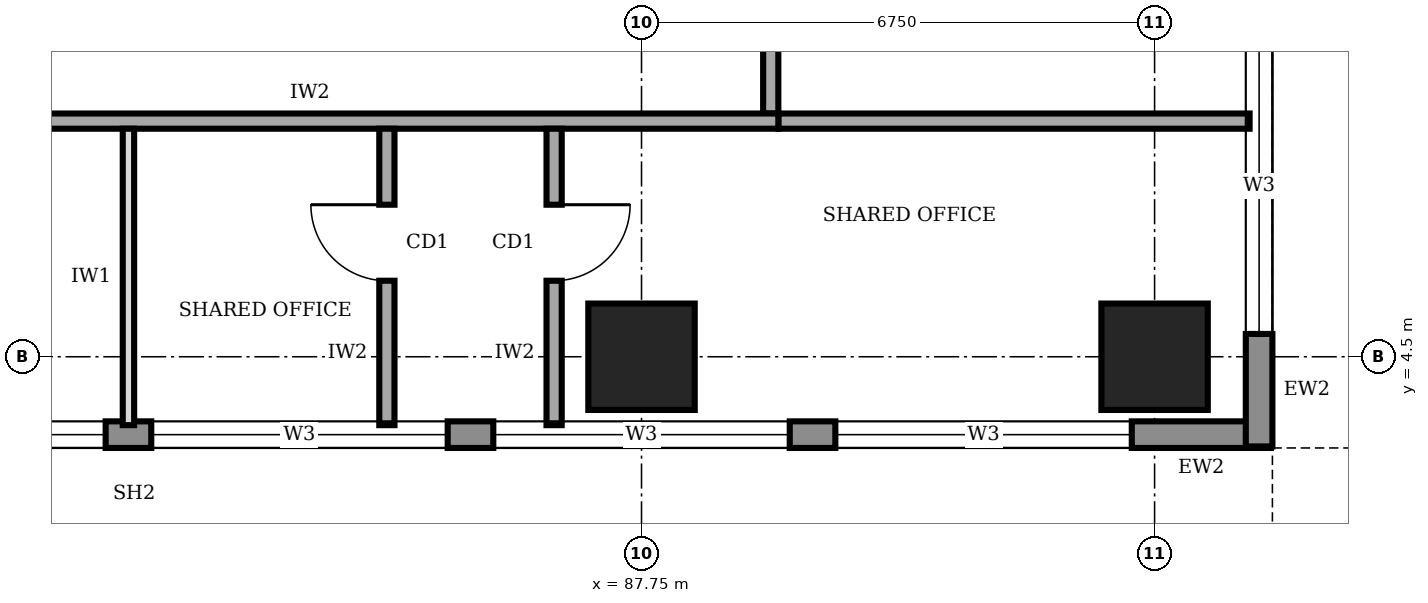
"""IFC4 building model, lengths in metres.
Left out: names, types, materials, properties, quantities, classifications, styles, units other than length and angle.
Written with IfcOpenShell. Run it as: python <this file> out.ifc"""

import sys

from ifc_helpers import new_model, si_unit, direction, frame, frame_2d, origin, origin_2d, place, context, subcontext, project, spatial, rectangle, extrude, element, fill, save


model = new_model("IFC4")
c1 = context("Model", 3, precision=1e-05, world=origin(), true_north=direction((0.0, 1.0)))
c2 = subcontext(c1, "Body", "Model", "MODEL_VIEW")
j1 = project(units=[si_unit("LENGTHUNIT", "METRE"), si_unit("PLANEANGLEUNIT", "RADIAN")], contexts=[c1])
p1 = place(None, origin())
s1 = spatial("IfcSite", under=j1, at=p1, CompositionType="ELEMENT")
p2 = place(p1, origin())
s2 = spatial("IfcBuilding", under=s1, at=p2, CompositionType="ELEMENT")
p3 = place(p2, frame((0.0, 0.0, 197.0)))
s3 = spatial("IfcBuildingStorey", under=s2, at=p3, CompositionType="ELEMENT", Elevation=197.0)
for number, where, z_axis, x_axis in (
    (1, (87.75, 4.5, 0.0), (0.0, 0.0, 1.0), (1.0, 0.0, 0.0)),
    (2, (94.5, 4.5, 0.0), (0.0, 0.0, 1.0), (1.0, 0.0, 0.0)),
):
    element("IfcColumn", number, at=place(p3, frame(where, z_axis=z_axis, x_axis=x_axis)), inside=s3, PredefinedType="COLUMN", context=c2, shape_type="SweptSolid", body=[
        extrude(rectangle(XDim=1.4, YDim=1.4, at=origin_2d()), origin(), (0.0, 0.0, 1.0), 4.0),
    ])
p4 = place(p3, frame((66.12, 3.475, 0.0), z_axis=(0.0, 0.0, 1.0), x_axis=(1.0, 0.0, 0.0)))
e3 = element("IfcWall", 3, at=p4, inside=s3, PredefinedType="STANDARD", context=c2, shape_type="SweptSolid", body=[
    extrude(rectangle(XDim=29.91, YDim=0.35, at=frame_2d((14.955, 0.0))), origin(), (0.0, 0.0, 1.0), 3.75),
])
p5 = place(p4, frame((1.68, 0.0, 0.95)))
e4 = element("IfcOpeningElement", 4, at=p5, cuts=e3, PredefinedType="OPENING", context=c2, shape_type="SweptSolid", body=[
    extrude(rectangle(XDim=3.9, YDim=1.8, at=frame_2d((1.95, 0.9))), frame((0.0, 0.185, 0.0), z_axis=(0.0, -1.0, 0.0), x_axis=(1.0, 0.0, 0.0)), (0.0, 0.0, 1.0), 0.37),
])
p6 = place(p4, frame((6.18, 0.0, 0.95)))
e5 = element("IfcOpeningElement", 5, at=p6, cuts=e3, PredefinedType="OPENING", context=c2, shape_type="SweptSolid", body=[
    extrude(rectangle(XDim=3.9, YDim=1.8, at=frame_2d((1.95, 0.9))), frame((0.0, 0.185, 0.0), z_axis=(0.0, -1.0, 0.0), x_axis=(1.0, 0.0, 0.0)), (0.0, 0.0, 1.0), 0.37),
])
p7 = place(p4, frame((10.68, 0.0, 0.95)))
e6 = element("IfcOpeningElement", 6, at=p7, cuts=e3, PredefinedType="OPENING", context=c2, shape_type="SweptSolid", body=[
    extrude(rectangle(XDim=3.9, YDim=1.8, at=frame_2d((1.95, 0.9))), frame((0.0, 0.185, 0.0), z_axis=(0.0, -1.0, 0.0), x_axis=(1.0, 0.0, 0.0)), (0.0, 0.0, 1.0), 0.37),
])
p8 = place(p4, frame((15.18, 0.0, 0.95)))
e7 = element("IfcOpeningElement", 7, at=p8, cuts=e3, PredefinedType="OPENING", context=c2, shape_type="SweptSolid", body=[
    extrude(rectangle(XDim=3.9, YDim=1.8, at=frame_2d((1.95, 0.9))), frame((0.0, 0.185, 0.0), z_axis=(0.0, -1.0, 0.0), x_axis=(1.0, 0.0, 0.0)), (0.0, 0.0, 1.0), 0.37),
])
p9 = place(p4, frame((19.68, 0.0, 0.95)))
e8 = element("IfcOpeningElement", 8, at=p9, cuts=e3, PredefinedType="OPENING", context=c2, shape_type="SweptSolid", body=[
    extrude(rectangle(XDim=3.9, YDim=1.8, at=frame_2d((1.95, 0.9))), frame((0.0, 0.185, 0.0), z_axis=(0.0, -1.0, 0.0), x_axis=(1.0, 0.0, 0.0)), (0.0, 0.0, 1.0), 0.37),
])
p10 = place(p4, frame((24.18, 0.0, 0.95)))
e9 = element("IfcOpeningElement", 9, at=p10, cuts=e3, PredefinedType="OPENING", context=c2, shape_type="SweptSolid", body=[
    extrude(rectangle(XDim=3.9, YDim=1.8, at=frame_2d((1.95, 0.9))), frame((0.0, 0.185, 0.0), z_axis=(0.0, -1.0, 0.0), x_axis=(1.0, 0.0, 0.0)), (0.0, 0.0, 1.0), 0.37),
])
p11 = place(p3, frame((95.875, 3.32, 0.0), z_axis=(0.0, 0.0, 1.0), x_axis=(0.0, 1.0, 0.0)))
e10 = element("IfcWall", 10, at=p11, inside=s3, PredefinedType="STANDARD", context=c2, shape_type="SweptSolid", body=[
    extrude(rectangle(XDim=33.86, YDim=0.35, at=frame_2d((16.93, 0.0))), origin(), (0.0, 0.0, 1.0), 3.75),
])
p12 = place(p11, frame((1.48, 0.0, 0.95)))
e11 = element("IfcOpeningElement", 11, at=p12, cuts=e10, PredefinedType="OPENING", context=c2, shape_type="SweptSolid", body=[
    extrude(rectangle(XDim=3.9, YDim=1.8, at=frame_2d((1.95, 0.9))), frame((0.0, 0.185, 0.0), z_axis=(0.0, -1.0, 0.0), x_axis=(1.0, 0.0, 0.0)), (0.0, 0.0, 1.0), 0.37),
])
p13 = place(p11, frame((5.98, 0.0, 0.95)))
e12 = element("IfcOpeningElement", 12, at=p13, cuts=e10, PredefinedType="OPENING", context=c2, shape_type="SweptSolid", body=[
    extrude(rectangle(XDim=3.9, YDim=1.8, at=frame_2d((1.95, 0.9))), frame((0.0, 0.185, 0.0), z_axis=(0.0, -1.0, 0.0), x_axis=(1.0, 0.0, 0.0)), (0.0, 0.0, 1.0), 0.37),
])
p14 = place(p11, frame((10.48, 0.0, 0.95)))
e13 = element("IfcOpeningElement", 13, at=p14, cuts=e10, PredefinedType="OPENING", context=c2, shape_type="SweptSolid", body=[
    extrude(rectangle(XDim=3.9, YDim=1.8, at=frame_2d((1.95, 0.9))), frame((0.0, 0.185, 0.0), z_axis=(0.0, -1.0, 0.0), x_axis=(1.0, 0.0, 0.0)), (0.0, 0.0, 1.0), 0.37),
])
p15 = place(p11, frame((14.98, 0.0, 0.95)))
e14 = element("IfcOpeningElement", 14, at=p15, cuts=e10, PredefinedType="OPENING", context=c2, shape_type="SweptSolid", body=[
    extrude(rectangle(XDim=3.9, YDim=1.8, at=frame_2d((1.95, 0.9))), frame((0.0, 0.185, 0.0), z_axis=(0.0, -1.0, 0.0), x_axis=(1.0, 0.0, 0.0)), (0.0, 0.0, 1.0), 0.37),
])
p16 = place(p11, frame((19.48, 0.0, 0.95)))
e15 = element("IfcOpeningElement", 15, at=p16, cuts=e10, PredefinedType="OPENING", context=c2, shape_type="SweptSolid", body=[
    extrude(rectangle(XDim=3.9, YDim=1.8, at=frame_2d((1.95, 0.9))), frame((0.0, 0.185, 0.0), z_axis=(0.0, -1.0, 0.0), x_axis=(1.0, 0.0, 0.0)), (0.0, 0.0, 1.0), 0.37),
])
p17 = place(p11, frame((23.98, 0.0, 0.95)))
e16 = element("IfcOpeningElement", 16, at=p17, cuts=e10, PredefinedType="OPENING", context=c2, shape_type="SweptSolid", body=[
    extrude(rectangle(XDim=3.9, YDim=1.8, at=frame_2d((1.95, 0.9))), frame((0.0, 0.185, 0.0), z_axis=(0.0, -1.0, 0.0), x_axis=(1.0, 0.0, 0.0)), (0.0, 0.0, 1.0), 0.37),
])
p18 = place(p11, frame((28.48, 0.0, 0.95)))
e17 = element("IfcOpeningElement", 17, at=p18, cuts=e10, PredefinedType="OPENING", context=c2, shape_type="SweptSolid", body=[
    extrude(rectangle(XDim=3.9, YDim=1.8, at=frame_2d((1.95, 0.9))), frame((0.0, 0.185, 0.0), z_axis=(0.0, -1.0, 0.0), x_axis=(1.0, 0.0, 0.0)), (0.0, 0.0, 1.0), 0.37),
])
p19 = place(p3, frame((72.65, 7.6, 0.0), z_axis=(0.0, 0.0, 1.0), x_axis=(1.0, 0.0, 0.0)))
e18 = element("IfcWall", 18, at=p19, inside=s3, PredefinedType="SOLIDWALL", context=c2, shape_type="SweptSolid", body=[
    extrude(rectangle(XDim=16.9, YDim=0.2, at=frame_2d((8.45, 0.0))), origin(), (0.0, 0.0, 1.0), 3.75),
])
p20 = place(p19, frame((3.575, 0.0, 0.0)))
e19 = element("IfcOpeningElement", 19, at=p20, cuts=e18, PredefinedType="OPENING", context=c2, shape_type="SweptSolid", body=[
    extrude(rectangle(XDim=1.0, YDim=2.1, at=frame_2d((0.5, 1.05))), frame((0.0, 0.11, 0.0), z_axis=(0.0, -1.0, 0.0), x_axis=(1.0, 0.0, 0.0)), (0.0, 0.0, 1.0), 0.22),
])
p21 = place(p3, frame((89.45, 7.7, 0.0), z_axis=(0.0, 0.0, 1.0), x_axis=(0.0, 1.0, 0.0)))
e20 = element("IfcWall", 20, at=p21, inside=s3, PredefinedType="SOLIDWALL", context=c2, shape_type="SweptSolid", body=[
    extrude(rectangle(XDim=25.3, YDim=0.2, at=frame_2d((12.65, 0.0))), origin(), (0.0, 0.0, 1.0), 3.75),
])
p22 = place(p21, frame((2.3, 0.0, 0.0)))
e21 = element("IfcOpeningElement", 21, at=p22, cuts=e20, PredefinedType="OPENING", context=c2, shape_type="SweptSolid", body=[
    extrude(rectangle(XDim=1.0, YDim=2.1, at=frame_2d((0.5, 1.05))), frame((0.0, 0.11, 0.0), z_axis=(0.0, -1.0, 0.0), x_axis=(1.0, 0.0, 0.0)), (0.0, 0.0, 1.0), 0.22),
])
p23 = place(p21, frame((7.25, 0.0, 0.0)))
e22 = element("IfcOpeningElement", 22, at=p23, cuts=e20, PredefinedType="OPENING", context=c2, shape_type="SweptSolid", body=[
    extrude(rectangle(XDim=0.9, YDim=2.1, at=frame_2d((0.45, 1.05))), frame((0.0, 0.11, 0.0), z_axis=(0.0, -1.0, 0.0), x_axis=(1.0, 0.0, 0.0)), (0.0, 0.0, 1.0), 0.22),
])
p24 = place(p21, frame((10.25, 0.0, 0.0)))
e23 = element("IfcOpeningElement", 23, at=p24, cuts=e20, PredefinedType="OPENING", context=c2, shape_type="SweptSolid", body=[
    extrude(rectangle(XDim=0.9, YDim=2.1, at=frame_2d((0.45, 1.05))), frame((0.0, 0.11, 0.0), z_axis=(0.0, -1.0, 0.0), x_axis=(1.0, 0.0, 0.0)), (0.0, 0.0, 1.0), 0.22),
])
p25 = place(p21, frame((15.1, 0.0, 0.0)))
e24 = element("IfcOpeningElement", 24, at=p25, cuts=e20, PredefinedType="OPENING", context=c2, shape_type="SweptSolid", body=[
    extrude(rectangle(XDim=0.9, YDim=2.1, at=frame_2d((0.45, 1.05))), frame((0.0, 0.11, 0.0), z_axis=(0.0, -1.0, 0.0), x_axis=(1.0, 0.0, 0.0)), (0.0, 0.0, 1.0), 0.22),
])
p26 = place(p21, frame((17.8, 0.0, 0.0)))
e25 = element("IfcOpeningElement", 25, at=p26, cuts=e20, PredefinedType="OPENING", context=c2, shape_type="SweptSolid", body=[
    extrude(rectangle(XDim=1.0, YDim=2.1, at=frame_2d((0.5, 1.05))), frame((0.0, 0.11, 0.0), z_axis=(0.0, -1.0, 0.0), x_axis=(1.0, 0.0, 0.0)), (0.0, 0.0, 1.0), 0.22),
])
p27 = place(p21, frame((12.3, 0.0, 0.0)))
e26 = element("IfcOpeningElement", 26, at=p27, cuts=e20, PredefinedType="OPENING", context=c2, shape_type="SweptSolid", body=[
    extrude(rectangle(XDim=1.0, YDim=2.1, at=frame_2d((0.5, 1.05))), frame((0.0, 0.11, 0.0), z_axis=(0.0, -1.0, 0.0), x_axis=(1.0, 0.0, 0.0)), (0.0, 0.0, 1.0), 0.22),
])
p28 = place(p21, frame((21.8, 0.0, 0.0)))
e27 = element("IfcOpeningElement", 27, at=p28, cuts=e20, PredefinedType="OPENING", context=c2, shape_type="SweptSolid", body=[
    extrude(rectangle(XDim=1.0, YDim=2.1, at=frame_2d((0.5, 1.05))), frame((0.0, 0.11, 0.0), z_axis=(0.0, -1.0, 0.0), x_axis=(1.0, 0.0, 0.0)), (0.0, 0.0, 1.0), 0.22),
])
p29 = place(p3, frame((84.4, 3.6, 0.0), z_axis=(0.0, 0.0, 1.0), x_axis=(0.0, 1.0, 0.0)))
e28 = element("IfcWall", 28, at=p29, inside=s3, PredefinedType="SOLIDWALL", context=c2, shape_type="SweptSolid", body=[
    extrude(rectangle(XDim=3.9, YDim=0.2, at=frame_2d((1.95, 0.0))), origin(), (0.0, 0.0, 1.0), 3.75),
])
p30 = place(p29, frame((1.9, 0.0, 0.0)))
e29 = element("IfcOpeningElement", 29, at=p30, cuts=e28, PredefinedType="OPENING", context=c2, shape_type="SweptSolid", body=[
    extrude(rectangle(XDim=1.0, YDim=2.1, at=frame_2d((0.5, 1.05))), frame((0.0, 0.11, 0.0), z_axis=(0.0, -1.0, 0.0), x_axis=(1.0, 0.0, 0.0)), (0.0, 0.0, 1.0), 0.22),
])
p31 = place(p3, frame((86.6, 7.5, 0.0), z_axis=(0.0, 0.0, 1.0), x_axis=(0.0, -1.0, 0.0)))
e30 = element("IfcWall", 30, at=p31, inside=s3, PredefinedType="SOLIDWALL", context=c2, shape_type="SweptSolid", body=[
    extrude(rectangle(XDim=3.9, YDim=0.2, at=frame_2d((1.95, 0.0))), origin(), (0.0, 0.0, 1.0), 3.75),
])
p32 = place(p31, frame((1.0, 0.0, 0.0)))
e31 = element("IfcOpeningElement", 31, at=p32, cuts=e30, PredefinedType="OPENING", context=c2, shape_type="SweptSolid", body=[
    extrude(rectangle(XDim=1.0, YDim=2.1, at=frame_2d((0.5, 1.05))), frame((0.0, 0.11, 0.0), z_axis=(0.0, -1.0, 0.0), x_axis=(1.0, 0.0, 0.0)), (0.0, 0.0, 1.0), 0.22),
])
p33 = place(p3, frame((89.55, 7.6, 0.0), z_axis=(0.0, 0.0, 1.0), x_axis=(1.0, 0.0, 0.0)))
e32 = element("IfcWall", 32, at=p33, inside=s3, PredefinedType="SOLIDWALL", context=c2, shape_type="SweptSolid", body=[
    extrude(rectangle(XDim=6.2, YDim=0.2, at=frame_2d((3.1, 0.0))), origin(), (0.0, 0.0, 1.0), 3.75),
])
p34 = place(p3, frame((81.0, 3.6, 0.0), z_axis=(0.0, 0.0, 1.0), x_axis=(0.0, 1.0, 0.0)))
e33 = element("IfcWall", 33, at=p34, inside=s3, PredefinedType="PARTITIONING", context=c2, shape_type="SweptSolid", body=[
    extrude(rectangle(XDim=3.9, YDim=0.15, at=frame_2d((1.95, 0.0))), origin(), (0.0, 0.0, 1.0), 3.75),
])
p35 = place(p7, origin())
e34 = element("IfcWindow", 34, at=p35, inside=s3, PartitioningType="SINGLE_PANEL", PredefinedType="WINDOW", context=c2, shape_type="SweptSolid", body=[
    extrude(rectangle(XDim=3.9, YDim=1.8, at=frame_2d((1.95, 0.9))), frame((0.0, 0.03, 0.0), z_axis=(0.0, -1.0, 0.0), x_axis=(1.0, 0.0, 0.0)), (0.0, 0.0, 1.0), 0.06),
])
fill(e6, e34)
p36 = place(p8, origin())
e35 = element("IfcWindow", 35, at=p36, inside=s3, PartitioningType="SINGLE_PANEL", PredefinedType="WINDOW", context=c2, shape_type="SweptSolid", body=[
    extrude(rectangle(XDim=3.9, YDim=1.8, at=frame_2d((1.95, 0.9))), frame((0.0, 0.03, 0.0), z_axis=(0.0, -1.0, 0.0), x_axis=(1.0, 0.0, 0.0)), (0.0, 0.0, 1.0), 0.06),
])
fill(e7, e35)
p37 = place(p9, origin())
e36 = element("IfcWindow", 36, at=p37, inside=s3, PartitioningType="SINGLE_PANEL", PredefinedType="WINDOW", context=c2, shape_type="SweptSolid", body=[
    extrude(rectangle(XDim=3.9, YDim=1.8, at=frame_2d((1.95, 0.9))), frame((0.0, 0.03, 0.0), z_axis=(0.0, -1.0, 0.0), x_axis=(1.0, 0.0, 0.0)), (0.0, 0.0, 1.0), 0.06),
])
fill(e8, e36)
p38 = place(p10, origin())
e37 = element("IfcWindow", 37, at=p38, inside=s3, PartitioningType="SINGLE_PANEL", PredefinedType="WINDOW", context=c2, shape_type="SweptSolid", body=[
    extrude(rectangle(XDim=3.9, YDim=1.8, at=frame_2d((1.95, 0.9))), frame((0.0, 0.03, 0.0), z_axis=(0.0, -1.0, 0.0), x_axis=(1.0, 0.0, 0.0)), (0.0, 0.0, 1.0), 0.06),
])
fill(e9, e37)
p39 = place(p12, origin())
e38 = element("IfcWindow", 38, at=p39, inside=s3, PartitioningType="SINGLE_PANEL", PredefinedType="WINDOW", context=c2, shape_type="SweptSolid", body=[
    extrude(rectangle(XDim=3.9, YDim=1.8, at=frame_2d((1.95, 0.9))), frame((0.0, 0.03, 0.0), z_axis=(0.0, -1.0, 0.0), x_axis=(1.0, 0.0, 0.0)), (0.0, 0.0, 1.0), 0.06),
])
fill(e11, e38)
p40 = place(p30, origin())
e39 = element("IfcDoor", 39, at=p40, inside=s3, OperationType="SINGLE_SWING_RIGHT", PredefinedType="DOOR", context=c2, shape_type="SweptSolid", body=[
    extrude(rectangle(XDim=1.0, YDim=2.1, at=frame_2d((0.5, 1.05))), frame((0.0, 0.025, 0.0), z_axis=(0.0, -1.0, 0.0), x_axis=(1.0, 0.0, 0.0)), (0.0, 0.0, 1.0), 0.05),
])
fill(e29, e39)
p41 = place(p32, origin())
e40 = element("IfcDoor", 40, at=p41, inside=s3, OperationType="SINGLE_SWING_LEFT", PredefinedType="DOOR", context=c2, shape_type="SweptSolid", body=[
    extrude(rectangle(XDim=1.0, YDim=2.1, at=frame_2d((0.5, 1.05))), frame((0.0, 0.025, 0.0), z_axis=(0.0, -1.0, 0.0), x_axis=(1.0, 0.0, 0.0)), (0.0, 0.0, 1.0), 0.05),
])
fill(e31, e40)
save(model, sys.argv[1])
